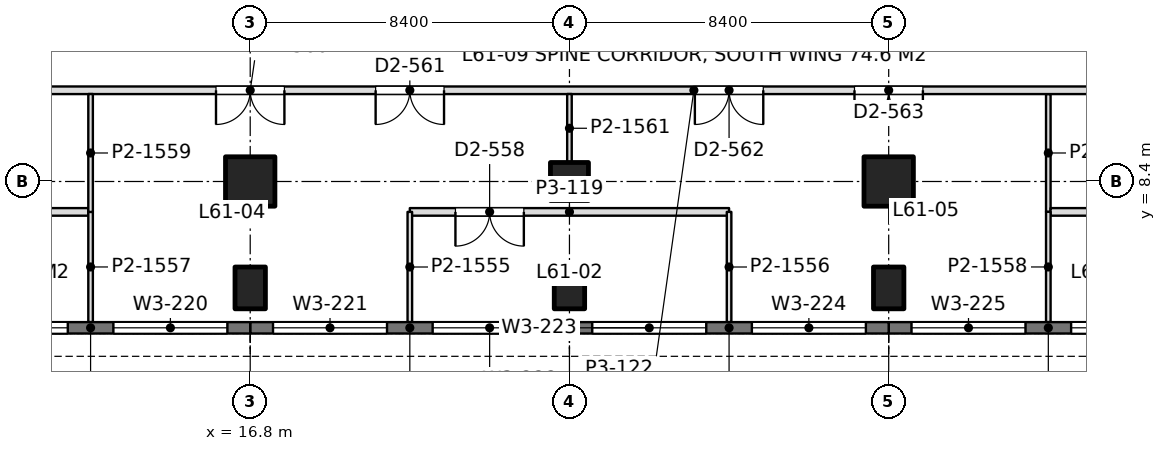
"""IFC4 building model, lengths in metres.
Left out: names, types, materials, properties, quantities, classifications, styles, units other than length and angle.
Written with IfcOpenShell. Run it as: python <this file> out.ifc"""

import sys

from ifc_helpers import new_model, si_unit, direction, frame, frame_2d, origin, origin_2d, place, context, subcontext, project, spatial, rectangle, extrude, element, fill, save


model = new_model("IFC4")
c1 = context("Model", 3, precision=1e-05, world=origin(), true_north=direction((0.0, 1.0)))
c2 = subcontext(c1, "Body", "Model", "MODEL_VIEW")
j1 = project(units=[si_unit("LENGTHUNIT", "METRE"), si_unit("PLANEANGLEUNIT", "RADIAN")], contexts=[c1])
p1 = place(None, origin())
s1 = spatial("IfcSite", under=j1, at=p1, CompositionType="ELEMENT")
p2 = place(p1, origin())
s2 = spatial("IfcBuilding", under=s1, at=p2, CompositionType="ELEMENT")
p3 = place(p2, frame((0.0, 0.0, 268.2)))
s3 = spatial("IfcBuildingStorey", under=s2, at=p3, CompositionType="ELEMENT", Elevation=268.2)
p4 = place(p3, frame((16.8, 5.6, 0.0), z_axis=(0.0, 0.0, 1.0), x_axis=(1.0, 0.0, 0.0)))
e1 = element("IfcColumn", 1, at=p4, inside=s3, PredefinedType="COLUMN", context=c2, shape_type="SweptSolid", body=[
    extrude(rectangle(XDim=0.8, YDim=1.1, at=origin_2d()), origin(), (0.0, 0.0, 1.0), 4.5),
])
p5 = place(p3, frame((16.8, 8.4, 0.0), z_axis=(0.0, 0.0, 1.0), x_axis=(1.0, 0.0, 0.0)))
e2 = element("IfcColumn", 2, at=p5, inside=s3, PredefinedType="COLUMN", context=c2, shape_type="SweptSolid", body=[
    extrude(rectangle(XDim=1.3, YDim=1.3, at=origin_2d()), origin(), (0.0, 0.0, 1.0), 4.5),
])
p6 = place(p3, frame((25.2, 5.6, 0.0), z_axis=(0.0, 0.0, 1.0), x_axis=(1.0, 0.0, 0.0)))
e3 = element("IfcColumn", 3, at=p6, inside=s3, PredefinedType="COLUMN", context=c2, shape_type="SweptSolid", body=[
    extrude(rectangle(XDim=0.8, YDim=1.1, at=origin_2d()), origin(), (0.0, 0.0, 1.0), 4.5),
])
p7 = place(p3, frame((25.2, 8.4, 0.0), z_axis=(0.0, 0.0, 1.0), x_axis=(1.0, 0.0, 0.0)))
e4 = element("IfcColumn", 4, at=p7, inside=s3, PredefinedType="COLUMN", context=c2, shape_type="SweptSolid", body=[
    extrude(rectangle(XDim=1.0, YDim=1.0, at=origin_2d()), origin(), (0.0, 0.0, 1.0), 4.5),
])
p8 = place(p3, frame((33.6, 5.6, 0.0), z_axis=(0.0, 0.0, 1.0), x_axis=(1.0, 0.0, 0.0)))
e5 = element("IfcColumn", 5, at=p8, inside=s3, PredefinedType="COLUMN", context=c2, shape_type="SweptSolid", body=[
    extrude(rectangle(XDim=0.8, YDim=1.1, at=origin_2d()), origin(), (0.0, 0.0, 1.0), 4.5),
])
p9 = place(p3, frame((33.6, 8.4, 0.0), z_axis=(0.0, 0.0, 1.0), x_axis=(1.0, 0.0, 0.0)))
e6 = element("IfcColumn", 6, at=p9, inside=s3, PredefinedType="COLUMN", context=c2, shape_type="SweptSolid", body=[
    extrude(rectangle(XDim=1.3, YDim=1.3, at=origin_2d()), origin(), (0.0, 0.0, 1.0), 4.5),
])
p10 = place(p3, frame((42.0, 4.55, 0.0), z_axis=(0.0, 0.0, 1.0), x_axis=(-1.0, 0.0, 0.0)))
e7 = element("IfcWall", 7, at=p10, inside=s3, PredefinedType="SOLIDWALL", context=c2, shape_type="SweptSolid", body=[
    extrude(rectangle(XDim=8.4, YDim=0.3, at=frame_2d((4.2, 0.0))), origin(), (0.0, 0.0, 1.0), 4.35),
])
p11 = place(p10, frame((0.6, 0.0, 0.9)))
e8 = element("IfcOpeningElement", 8, at=p11, cuts=e7, PredefinedType="OPENING", context=c2, shape_type="SweptSolid", body=[
    extrude(rectangle(XDim=3.0, YDim=2.4, at=frame_2d((1.5, 1.2))), frame((0.0, 0.16, 0.0), z_axis=(0.0, -1.0, 0.0), x_axis=(1.0, 0.0, 0.0)), (0.0, 0.0, 1.0), 0.32),
])
p12 = place(p10, frame((4.8, 0.0, 0.9)))
e9 = element("IfcOpeningElement", 9, at=p12, cuts=e7, PredefinedType="OPENING", context=c2, shape_type="SweptSolid", body=[
    extrude(rectangle(XDim=3.0, YDim=2.4, at=frame_2d((1.5, 1.2))), frame((0.0, 0.16, 0.0), z_axis=(0.0, -1.0, 0.0), x_axis=(1.0, 0.0, 0.0)), (0.0, 0.0, 1.0), 0.32),
])
p13 = place(p3, frame((33.6, 4.55, 0.0), z_axis=(0.0, 0.0, 1.0), x_axis=(-1.0, 0.0, 0.0)))
e10 = element("IfcWall", 10, at=p13, inside=s3, PredefinedType="SOLIDWALL", context=c2, shape_type="SweptSolid", body=[
    extrude(rectangle(XDim=8.4, YDim=0.3, at=frame_2d((4.2, 0.0))), origin(), (0.0, 0.0, 1.0), 4.35),
])
p14 = place(p13, frame((0.6, 0.0, 0.9)))
e11 = element("IfcOpeningElement", 11, at=p14, cuts=e10, PredefinedType="OPENING", context=c2, shape_type="SweptSolid", body=[
    extrude(rectangle(XDim=3.0, YDim=2.4, at=frame_2d((1.5, 1.2))), frame((0.0, 0.16, 0.0), z_axis=(0.0, -1.0, 0.0), x_axis=(1.0, 0.0, 0.0)), (0.0, 0.0, 1.0), 0.32),
])
p15 = place(p13, frame((4.8, 0.0, 0.9)))
e12 = element("IfcOpeningElement", 12, at=p15, cuts=e10, PredefinedType="OPENING", context=c2, shape_type="SweptSolid", body=[
    extrude(rectangle(XDim=3.0, YDim=2.4, at=frame_2d((1.5, 1.2))), frame((0.0, 0.16, 0.0), z_axis=(0.0, -1.0, 0.0), x_axis=(1.0, 0.0, 0.0)), (0.0, 0.0, 1.0), 0.32),
])
p16 = place(p3, frame((25.2, 4.55, 0.0), z_axis=(0.0, 0.0, 1.0), x_axis=(-1.0, 0.0, 0.0)))
e13 = element("IfcWall", 13, at=p16, inside=s3, PredefinedType="SOLIDWALL", context=c2, shape_type="SweptSolid", body=[
    extrude(rectangle(XDim=8.4, YDim=0.3, at=frame_2d((4.2, 0.0))), origin(), (0.0, 0.0, 1.0), 4.35),
])
p17 = place(p16, frame((0.6, 0.0, 0.9)))
e14 = element("IfcOpeningElement", 14, at=p17, cuts=e13, PredefinedType="OPENING", context=c2, shape_type="SweptSolid", body=[
    extrude(rectangle(XDim=3.0, YDim=2.4, at=frame_2d((1.5, 1.2))), frame((0.0, 0.16, 0.0), z_axis=(0.0, -1.0, 0.0), x_axis=(1.0, 0.0, 0.0)), (0.0, 0.0, 1.0), 0.32),
])
p18 = place(p16, frame((4.8, 0.0, 0.9)))
e15 = element("IfcOpeningElement", 15, at=p18, cuts=e13, PredefinedType="OPENING", context=c2, shape_type="SweptSolid", body=[
    extrude(rectangle(XDim=3.0, YDim=2.4, at=frame_2d((1.5, 1.2))), frame((0.0, 0.16, 0.0), z_axis=(0.0, -1.0, 0.0), x_axis=(1.0, 0.0, 0.0)), (0.0, 0.0, 1.0), 0.32),
])
p19 = place(p3, frame((16.8, 4.55, 0.0), z_axis=(0.0, 0.0, 1.0), x_axis=(-1.0, 0.0, 0.0)))
e16 = element("IfcWall", 16, at=p19, inside=s3, PredefinedType="SOLIDWALL", context=c2, shape_type="SweptSolid", body=[
    extrude(rectangle(XDim=8.4, YDim=0.3, at=frame_2d((4.2, 0.0))), origin(), (0.0, 0.0, 1.0), 4.35),
])
p20 = place(p19, frame((0.6, 0.0, 0.9)))
e17 = element("IfcOpeningElement", 17, at=p20, cuts=e16, PredefinedType="OPENING", context=c2, shape_type="SweptSolid", body=[
    extrude(rectangle(XDim=3.0, YDim=2.4, at=frame_2d((1.5, 1.2))), frame((0.0, 0.16, 0.0), z_axis=(0.0, -1.0, 0.0), x_axis=(1.0, 0.0, 0.0)), (0.0, 0.0, 1.0), 0.32),
])
p21 = place(p19, frame((4.8, 0.0, 0.9)))
e18 = element("IfcOpeningElement", 18, at=p21, cuts=e16, PredefinedType="OPENING", context=c2, shape_type="SweptSolid", body=[
    extrude(rectangle(XDim=3.0, YDim=2.4, at=frame_2d((1.5, 1.2))), frame((0.0, 0.16, 0.0), z_axis=(0.0, -1.0, 0.0), x_axis=(1.0, 0.0, 0.0)), (0.0, 0.0, 1.0), 0.32),
])
p22 = place(p3, frame((-0.902, 7.6, 0.0), z_axis=(0.0, 0.0, 1.0), x_axis=(1.0, 0.0, 0.0)))
e19 = element("IfcWall", 19, at=p22, inside=s3, PredefinedType="PARTITIONING", context=c2, shape_type="SweptSolid", body=[
    extrude(rectangle(XDim=13.444, YDim=0.2, at=frame_2d((6.722, 0.0))), origin(), (0.0, 0.0, 1.0), 3.86),
])
p23 = place(p22, frame((6.202, 0.0, 0.0)))
e20 = element("IfcOpeningElement", 20, at=p23, cuts=e19, PredefinedType="OPENING", context=c2, shape_type="SweptSolid", body=[
    extrude(rectangle(XDim=1.1, YDim=2.4, at=frame_2d((0.55, 1.2))), frame((0.0, 0.11, 0.0), z_axis=(0.0, -1.0, 0.0), x_axis=(1.0, 0.0, 0.0)), (0.0, 0.0, 1.0), 0.22),
])
p24 = place(p3, frame((12.6, 4.7, 0.0), z_axis=(0.0, 0.0, 1.0), x_axis=(0.0, 1.0, 0.0)))
e21 = element("IfcWall", 21, at=p24, inside=s3, PredefinedType="PARTITIONING", context=c2, shape_type="SweptSolid", body=[
    extrude(rectangle(XDim=2.902, YDim=0.12, at=frame_2d((1.451, 0.0))), origin(), (0.0, 0.0, 1.0), 3.86),
])
p25 = place(p3, frame((21.0, 7.6, 0.0), z_axis=(0.0, 0.0, 1.0), x_axis=(1.0, 0.0, 0.0)))
e22 = element("IfcWall", 22, at=p25, inside=s3, PredefinedType="PARTITIONING", context=c2, shape_type="SweptSolid", body=[
    extrude(rectangle(XDim=8.4, YDim=0.2, at=frame_2d((4.2, 0.0))), origin(), (0.0, 0.0, 1.0), 3.99),
])
p26 = place(p25, frame((1.2, 0.0, 0.0)))
e23 = element("IfcOpeningElement", 23, at=p26, cuts=e22, PredefinedType="OPENING", context=c2, shape_type="SweptSolid", body=[
    extrude(rectangle(XDim=1.8, YDim=2.2, at=frame_2d((0.9, 1.1))), frame((0.0, 0.11, 0.0), z_axis=(0.0, -1.0, 0.0), x_axis=(1.0, 0.0, 0.0)), (0.0, 0.0, 1.0), 0.22),
])
for number, where, z_axis, x_axis in (
    (24, (21.0, 4.7, 0.0), (0.0, 0.0, 1.0), (0.0, 1.0, 0.0)),
    (25, (29.4, 4.7, 0.0), (0.0, 0.0, 1.0), (0.0, 1.0, 0.0)),
):
    element("IfcWall", number, at=place(p3, frame(where, z_axis=z_axis, x_axis=x_axis)), inside=s3, PredefinedType="PARTITIONING", context=c2, shape_type="SweptSolid", body=[
        extrude(rectangle(XDim=2.9, YDim=0.12, at=frame_2d((1.45, 0.0))), origin(), (0.0, 0.0, 1.0), 3.86),
    ])
p27 = place(p3, frame((37.858, 7.6, 0.0), z_axis=(0.0, 0.0, 1.0), x_axis=(1.0, 0.0, 0.0)))
e26 = element("IfcWall", 26, at=p27, inside=s3, PredefinedType="PARTITIONING", context=c2, shape_type="SweptSolid", body=[
    extrude(rectangle(XDim=13.444, YDim=0.2, at=frame_2d((6.722, 0.0))), origin(), (0.0, 0.0, 1.0), 3.86),
])
p28 = place(p27, frame((6.142, 0.0, 0.0)))
e27 = element("IfcOpeningElement", 27, at=p28, cuts=e26, PredefinedType="OPENING", context=c2, shape_type="SweptSolid", body=[
    extrude(rectangle(XDim=1.1, YDim=2.4, at=frame_2d((0.55, 1.2))), frame((0.0, 0.11, 0.0), z_axis=(0.0, -1.0, 0.0), x_axis=(1.0, 0.0, 0.0)), (0.0, 0.0, 1.0), 0.22),
])
p29 = place(p3, frame((37.8, 4.7, 0.0), z_axis=(0.0, 0.0, 1.0), x_axis=(0.0, 1.0, 0.0)))
e28 = element("IfcWall", 28, at=p29, inside=s3, PredefinedType="PARTITIONING", context=c2, shape_type="SweptSolid", body=[
    extrude(rectangle(XDim=2.902, YDim=0.12, at=frame_2d((1.451, 0.0))), origin(), (0.0, 0.0, 1.0), 3.86),
])
p30 = place(p3, frame((12.6, 7.598, 0.0), z_axis=(0.0, 0.0, 1.0), x_axis=(0.0, 1.0, 0.0)))
e29 = element("IfcWall", 29, at=p30, inside=s3, PredefinedType="PARTITIONING", context=c2, shape_type="SweptSolid", body=[
    extrude(rectangle(XDim=3.104, YDim=0.12, at=frame_2d((1.552, 0.0))), origin(), (0.0, 0.0, 1.0), 3.8),
])
p31 = place(p3, frame((25.2, 8.899, 0.0), z_axis=(0.0, 0.0, 1.0), x_axis=(0.0, 1.0, 0.0)))
e30 = element("IfcWall", 30, at=p31, inside=s3, PredefinedType="PARTITIONING", context=c2, shape_type="SweptSolid", body=[
    extrude(rectangle(XDim=1.803, YDim=0.12, at=frame_2d((0.901, 0.0))), origin(), (0.0, 0.0, 1.0), 3.8),
])
p32 = place(p3, frame((37.8, 7.598, 0.0), z_axis=(0.0, 0.0, 1.0), x_axis=(0.0, 1.0, 0.0)))
e31 = element("IfcWall", 31, at=p32, inside=s3, PredefinedType="PARTITIONING", context=c2, shape_type="SweptSolid", body=[
    extrude(rectangle(XDim=3.104, YDim=0.12, at=frame_2d((1.552, 0.0))), origin(), (0.0, 0.0, 1.0), 3.8),
])
p33 = place(p3, frame((7.748, 10.8, 0.0), z_axis=(0.0, 0.0, 1.0), x_axis=(1.0, 0.0, 0.0)))
e32 = element("IfcWall", 32, at=p33, inside=s3, PredefinedType="PARTITIONING", context=c2, shape_type="SweptSolid", body=[
    extrude(rectangle(XDim=41.452, YDim=0.2, at=frame_2d((20.726, 0.0))), origin(), (0.0, 0.0, 1.0), 3.8),
])
p34 = place(p33, frame((1.527, 0.0, 0.0)))
e33 = element("IfcOpeningElement", 33, at=p34, cuts=e32, PredefinedType="OPENING", context=c2, shape_type="SweptSolid", body=[
    extrude(rectangle(XDim=1.8, YDim=2.2, at=frame_2d((0.9, 1.1))), frame((0.0, 0.11, 0.0), z_axis=(0.0, -1.0, 0.0), x_axis=(1.0, 0.0, 0.0)), (0.0, 0.0, 1.0), 0.22),
])
p35 = place(p33, frame((8.152, 0.0, 0.0)))
e34 = element("IfcOpeningElement", 34, at=p35, cuts=e32, PredefinedType="OPENING", context=c2, shape_type="SweptSolid", body=[
    extrude(rectangle(XDim=1.8, YDim=2.2, at=frame_2d((0.9, 1.1))), frame((0.0, 0.11, 0.0), z_axis=(0.0, -1.0, 0.0), x_axis=(1.0, 0.0, 0.0)), (0.0, 0.0, 1.0), 0.22),
])
p36 = place(p33, frame((12.352, 0.0, 0.0)))
e35 = element("IfcOpeningElement", 35, at=p36, cuts=e32, PredefinedType="OPENING", context=c2, shape_type="SweptSolid", body=[
    extrude(rectangle(XDim=1.8, YDim=2.2, at=frame_2d((0.9, 1.1))), frame((0.0, 0.11, 0.0), z_axis=(0.0, -1.0, 0.0), x_axis=(1.0, 0.0, 0.0)), (0.0, 0.0, 1.0), 0.22),
])
p37 = place(p33, frame((20.752, 0.0, 0.0)))
e36 = element("IfcOpeningElement", 36, at=p37, cuts=e32, PredefinedType="OPENING", context=c2, shape_type="SweptSolid", body=[
    extrude(rectangle(XDim=1.8, YDim=2.2, at=frame_2d((0.9, 1.1))), frame((0.0, 0.11, 0.0), z_axis=(0.0, -1.0, 0.0), x_axis=(1.0, 0.0, 0.0)), (0.0, 0.0, 1.0), 0.22),
])
p38 = place(p33, frame((24.952, 0.0, 0.0)))
e37 = element("IfcOpeningElement", 37, at=p38, cuts=e32, PredefinedType="OPENING", context=c2, shape_type="SweptSolid", body=[
    extrude(rectangle(XDim=1.8, YDim=2.2, at=frame_2d((0.9, 1.1))), frame((0.0, 0.11, 0.0), z_axis=(0.0, -1.0, 0.0), x_axis=(1.0, 0.0, 0.0)), (0.0, 0.0, 1.0), 0.22),
])
p39 = place(p33, frame((32.952, 0.0, 0.0)))
e38 = element("IfcOpeningElement", 38, at=p39, cuts=e32, PredefinedType="OPENING", context=c2, shape_type="SweptSolid", body=[
    extrude(rectangle(XDim=1.8, YDim=2.2, at=frame_2d((0.9, 1.1))), frame((0.0, 0.11, 0.0), z_axis=(0.0, -1.0, 0.0), x_axis=(1.0, 0.0, 0.0)), (0.0, 0.0, 1.0), 0.22),
])
p40 = place(p33, frame((36.752, 0.0, 0.0)))
e39 = element("IfcOpeningElement", 39, at=p40, cuts=e32, PredefinedType="OPENING", context=c2, shape_type="SweptSolid", body=[
    extrude(rectangle(XDim=1.8, YDim=2.2, at=frame_2d((0.9, 1.1))), frame((0.0, 0.11, 0.0), z_axis=(0.0, -1.0, 0.0), x_axis=(1.0, 0.0, 0.0)), (0.0, 0.0, 1.0), 0.22),
])
p41 = place(p11, origin())
e40 = element("IfcWindow", 40, at=p41, inside=s3, PartitioningType="SINGLE_PANEL", PredefinedType="WINDOW", context=c2, shape_type="SweptSolid", body=[
    extrude(rectangle(XDim=3.0, YDim=2.4, at=frame_2d((1.5, 1.2))), frame((0.0, 0.03, 0.0), z_axis=(0.0, -1.0, 0.0), x_axis=(1.0, 0.0, 0.0)), (0.0, 0.0, 1.0), 0.06),
])
fill(e8, e40)
p42 = place(p12, origin())
e41 = element("IfcWindow", 41, at=p42, inside=s3, PartitioningType="SINGLE_PANEL", PredefinedType="WINDOW", context=c2, shape_type="SweptSolid", body=[
    extrude(rectangle(XDim=3.0, YDim=2.4, at=frame_2d((1.5, 1.2))), frame((0.0, 0.03, 0.0), z_axis=(0.0, -1.0, 0.0), x_axis=(1.0, 0.0, 0.0)), (0.0, 0.0, 1.0), 0.06),
])
fill(e9, e41)
p43 = place(p14, origin())
e42 = element("IfcWindow", 42, at=p43, inside=s3, PartitioningType="SINGLE_PANEL", PredefinedType="WINDOW", context=c2, shape_type="SweptSolid", body=[
    extrude(rectangle(XDim=3.0, YDim=2.4, at=frame_2d((1.5, 1.2))), frame((0.0, 0.03, 0.0), z_axis=(0.0, -1.0, 0.0), x_axis=(1.0, 0.0, 0.0)), (0.0, 0.0, 1.0), 0.06),
])
fill(e11, e42)
p44 = place(p15, origin())
e43 = element("IfcWindow", 43, at=p44, inside=s3, PartitioningType="SINGLE_PANEL", PredefinedType="WINDOW", context=c2, shape_type="SweptSolid", body=[
    extrude(rectangle(XDim=3.0, YDim=2.4, at=frame_2d((1.5, 1.2))), frame((0.0, 0.03, 0.0), z_axis=(0.0, -1.0, 0.0), x_axis=(1.0, 0.0, 0.0)), (0.0, 0.0, 1.0), 0.06),
])
fill(e12, e43)
p45 = place(p17, origin())
e44 = element("IfcWindow", 44, at=p45, inside=s3, PartitioningType="SINGLE_PANEL", PredefinedType="WINDOW", context=c2, shape_type="SweptSolid", body=[
    extrude(rectangle(XDim=3.0, YDim=2.4, at=frame_2d((1.5, 1.2))), frame((0.0, 0.03, 0.0), z_axis=(0.0, -1.0, 0.0), x_axis=(1.0, 0.0, 0.0)), (0.0, 0.0, 1.0), 0.06),
])
fill(e14, e44)
p46 = place(p18, origin())
e45 = element("IfcWindow", 45, at=p46, inside=s3, PartitioningType="SINGLE_PANEL", PredefinedType="WINDOW", context=c2, shape_type="SweptSolid", body=[
    extrude(rectangle(XDim=3.0, YDim=2.4, at=frame_2d((1.5, 1.2))), frame((0.0, 0.03, 0.0), z_axis=(0.0, -1.0, 0.0), x_axis=(1.0, 0.0, 0.0)), (0.0, 0.0, 1.0), 0.06),
])
fill(e15, e45)
p47 = place(p20, origin())
e46 = element("IfcWindow", 46, at=p47, inside=s3, PartitioningType="SINGLE_PANEL", PredefinedType="WINDOW", context=c2, shape_type="SweptSolid", body=[
    extrude(rectangle(XDim=3.0, YDim=2.4, at=frame_2d((1.5, 1.2))), frame((0.0, 0.03, 0.0), z_axis=(0.0, -1.0, 0.0), x_axis=(1.0, 0.0, 0.0)), (0.0, 0.0, 1.0), 0.06),
])
fill(e17, e46)
p48 = place(p21, origin())
e47 = element("IfcWindow", 47, at=p48, inside=s3, PartitioningType="SINGLE_PANEL", PredefinedType="WINDOW", context=c2, shape_type="SweptSolid", body=[
    extrude(rectangle(XDim=3.0, YDim=2.4, at=frame_2d((1.5, 1.2))), frame((0.0, 0.03, 0.0), z_axis=(0.0, -1.0, 0.0), x_axis=(1.0, 0.0, 0.0)), (0.0, 0.0, 1.0), 0.06),
])
fill(e18, e47)
p49 = place(p26, frame((1.8, 0.0, 0.0), z_axis=(0.0, 0.0, 1.0), x_axis=(-1.0, 0.0, 0.0)))
e48 = element("IfcDoor", 48, at=p49, inside=s3, OperationType="DOUBLE_DOOR_SINGLE_SWING", PredefinedType="DOOR", context=c2, shape_type="SweptSolid", body=[
    extrude(rectangle(XDim=1.8, YDim=2.2, at=frame_2d((0.9, 1.1))), frame((0.0, 0.025, 0.0), z_axis=(0.0, -1.0, 0.0), x_axis=(1.0, 0.0, 0.0)), (0.0, 0.0, 1.0), 0.05),
])
fill(e23, e48)
p50 = place(p35, frame((1.8, 0.0, 0.0), z_axis=(0.0, 0.0, 1.0), x_axis=(-1.0, 0.0, 0.0)))
e49 = element("IfcDoor", 49, at=p50, inside=s3, OperationType="DOUBLE_DOOR_SINGLE_SWING", PredefinedType="DOOR", context=c2, shape_type="SweptSolid", body=[
    extrude(rectangle(XDim=1.8, YDim=2.2, at=frame_2d((0.9, 1.1))), frame((0.0, 0.025, 0.0), z_axis=(0.0, -1.0, 0.0), x_axis=(1.0, 0.0, 0.0)), (0.0, 0.0, 1.0), 0.05),
])
fill(e34, e49)
p51 = place(p36, frame((1.8, 0.0, 0.0), z_axis=(0.0, 0.0, 1.0), x_axis=(-1.0, 0.0, 0.0)))
e50 = element("IfcDoor", 50, at=p51, inside=s3, OperationType="DOUBLE_DOOR_SINGLE_SWING", PredefinedType="DOOR", context=c2, shape_type="SweptSolid", body=[
    extrude(rectangle(XDim=1.8, YDim=2.2, at=frame_2d((0.9, 1.1))), frame((0.0, 0.025, 0.0), z_axis=(0.0, -1.0, 0.0), x_axis=(1.0, 0.0, 0.0)), (0.0, 0.0, 1.0), 0.05),
])
fill(e35, e50)
p52 = place(p37, frame((1.8, 0.0, 0.0), z_axis=(0.0, 0.0, 1.0), x_axis=(-1.0, 0.0, 0.0)))
e51 = element("IfcDoor", 51, at=p52, inside=s3, OperationType="DOUBLE_DOOR_SINGLE_SWING", PredefinedType="DOOR", context=c2, shape_type="SweptSolid", body=[
    extrude(rectangle(XDim=1.8, YDim=2.2, at=frame_2d((0.9, 1.1))), frame((0.0, 0.025, 0.0), z_axis=(0.0, -1.0, 0.0), x_axis=(1.0, 0.0, 0.0)), (0.0, 0.0, 1.0), 0.05),
])
fill(e36, e51)
p53 = place(p38, frame((1.8, 0.0, 0.0), z_axis=(0.0, 0.0, 1.0), x_axis=(-1.0, 0.0, 0.0)))
e52 = element("IfcDoor", 52, at=p53, inside=s3, OperationType="DOUBLE_DOOR_SINGLE_SWING", PredefinedType="DOOR", context=c2, shape_type="SweptSolid", body=[
    extrude(rectangle(XDim=1.8, YDim=2.2, at=frame_2d((0.9, 1.1))), frame((0.0, 0.025, 0.0), z_axis=(0.0, -1.0, 0.0), x_axis=(1.0, 0.0, 0.0)), (0.0, 0.0, 1.0), 0.05),
])
fill(e37, e52)
save(model, sys.argv[1])
